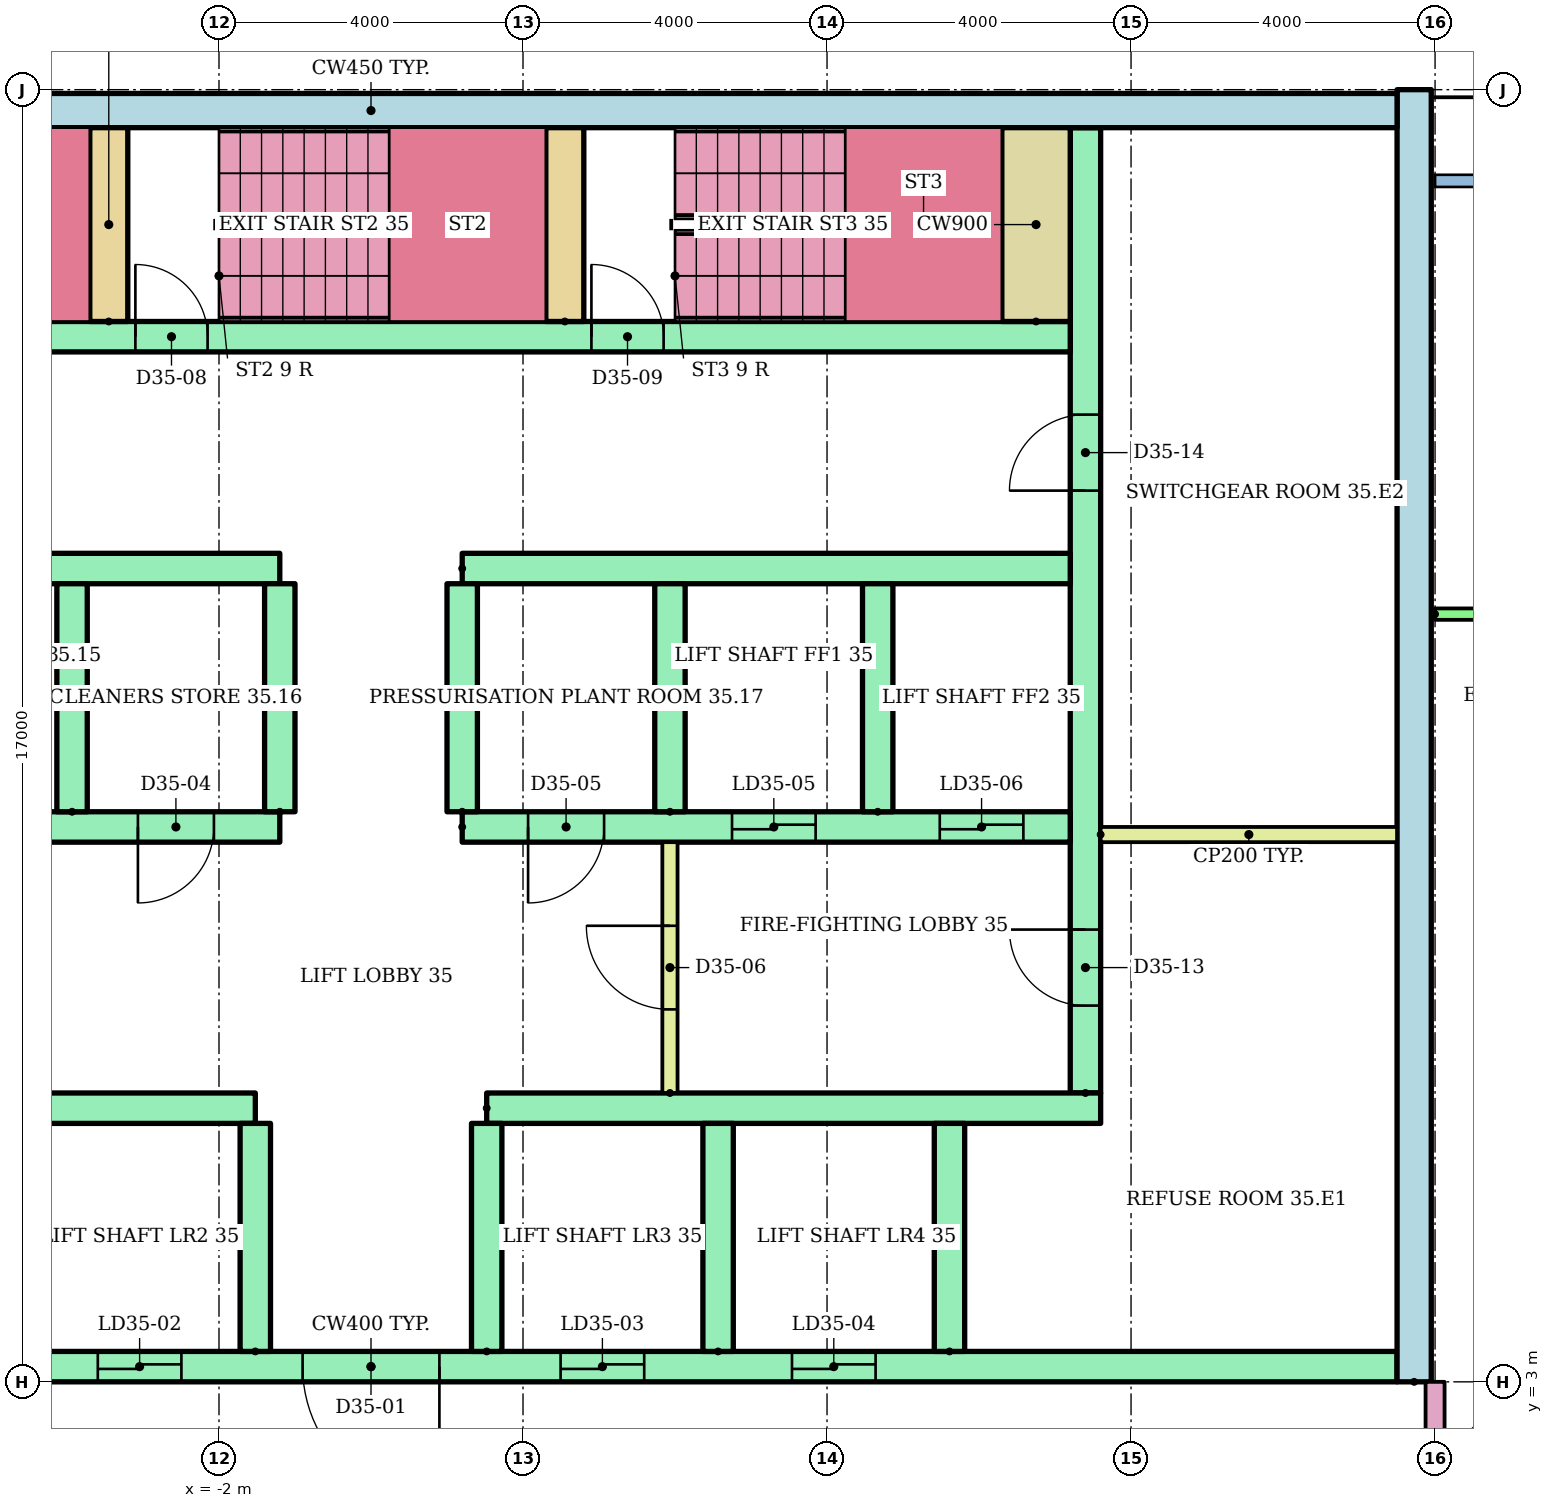
"""IFC4 building model, lengths in metres.
Left out: names, types, materials, properties, quantities, classifications, styles, units other than length and angle.
Written with IfcOpenShell. Run it as: python <this file> out.ifc"""

import sys

from ifc_helpers import new_model, si_unit, direction, frame, frame_2d, origin, place, context, subcontext, project, spatial, rectangle, extrude, element, fill, save


model = new_model("IFC4")
c1 = context("Model", 3, precision=1e-05, world=origin(), true_north=direction((0.0, 1.0)))
c2 = subcontext(c1, "Body", "Model", "MODEL_VIEW")
j1 = project(units=[si_unit("LENGTHUNIT", "METRE"), si_unit("PLANEANGLEUNIT", "RADIAN")], contexts=[c1])
p1 = place(None, origin())
s1 = spatial("IfcSite", under=j1, at=p1, CompositionType="ELEMENT")
p2 = place(p1, origin())
s2 = spatial("IfcBuilding", under=s1, at=p2, CompositionType="ELEMENT")
p3 = place(p2, frame((0.0, 0.0, 135.8)))
s3 = spatial("IfcBuildingStorey", under=s2, at=p3, CompositionType="ELEMENT", Elevation=135.8)
p4 = place(p3, frame((13.725, 3.0, 0.0), z_axis=(0.0, 0.0, 1.0), x_axis=(0.0, 1.0, 0.0)))
e1 = element("IfcWall", 1, at=p4, inside=s3, PredefinedType="SHEAR", context=c2, shape_type="SweptSolid", body=[
    extrude(rectangle(XDim=17.0, YDim=0.45, at=frame_2d((8.5, 0.0))), origin(), (0.0, 0.0, 1.0), 2.92),
])
p5 = place(p3, frame((-13.5, 19.725, 0.0)))
e2 = element("IfcWall", 2, at=p5, inside=s3, PredefinedType="SHEAR", context=c2, shape_type="SweptSolid", body=[
    extrude(rectangle(XDim=27.0, YDim=0.45, at=frame_2d((13.5, 0.0))), origin(), (0.0, 0.0, 1.0), 2.92),
])
p6 = place(p3, frame((9.4, 6.8, 0.0), z_axis=(0.0, 0.0, 1.0), x_axis=(0.0, 1.0, 0.0)))
e3 = element("IfcWall", 3, at=p6, inside=s3, PredefinedType="SHEAR", context=c2, shape_type="SweptSolid", body=[
    extrude(rectangle(XDim=12.7, YDim=0.4, at=frame_2d((6.35, 0.0))), origin(), (0.0, 0.0, 1.0), 2.92),
])
p7 = place(p6, frame((1.15, 0.0, 0.0)))
e4 = element("IfcOpeningElement", 4, at=p7, cuts=e3, PredefinedType="OPENING", context=c2, shape_type="SweptSolid", body=[
    extrude(rectangle(XDim=1.0, YDim=2.1, at=frame_2d((0.5, 1.05))), frame((0.0, 0.21, 0.0), z_axis=(0.0, -1.0, 0.0), x_axis=(1.0, 0.0, 0.0)), (0.0, 0.0, 1.0), 0.42),
])
p8 = place(p6, frame((7.925, 0.0, 0.0)))
e5 = element("IfcOpeningElement", 5, at=p8, cuts=e3, PredefinedType="OPENING", context=c2, shape_type="SweptSolid", body=[
    extrude(rectangle(XDim=1.0, YDim=2.1, at=frame_2d((0.5, 1.05))), frame((0.0, 0.21, 0.0), z_axis=(0.0, -1.0, 0.0), x_axis=(1.0, 0.0, 0.0)), (0.0, 0.0, 1.0), 0.42),
])
p9 = place(p3, frame((-13.5, 3.2, 0.0)))
e6 = element("IfcWall", 6, at=p9, inside=s3, PredefinedType="SHEAR", context=c2, shape_type="SweptSolid", body=[
    extrude(rectangle(XDim=27.0, YDim=0.4, at=frame_2d((13.5, 0.0))), origin(), (0.0, 0.0, 1.0), 2.92),
])
p10 = place(p9, frame((6.861, 0.0, 0.0)))
e7 = element("IfcOpeningElement", 7, at=p10, cuts=e6, PredefinedType="OPENING", context=c2, shape_type="SweptSolid", body=[
    extrude(rectangle(XDim=1.1, YDim=2.1, at=frame_2d((0.55, 1.05))), frame((0.0, 0.21, 0.0), z_axis=(0.0, -1.0, 0.0), x_axis=(1.0, 0.0, 0.0)), (0.0, 0.0, 1.0), 0.42),
])
p11 = place(p9, frame((9.906, 0.0, 0.0)))
e8 = element("IfcOpeningElement", 8, at=p11, cuts=e6, PredefinedType="OPENING", context=c2, shape_type="SweptSolid", body=[
    extrude(rectangle(XDim=1.1, YDim=2.1, at=frame_2d((0.55, 1.05))), frame((0.0, 0.21, 0.0), z_axis=(0.0, -1.0, 0.0), x_axis=(1.0, 0.0, 0.0)), (0.0, 0.0, 1.0), 0.42),
])
p12 = place(p9, frame((15.994, 0.0, 0.0)))
e9 = element("IfcOpeningElement", 9, at=p12, cuts=e6, PredefinedType="OPENING", context=c2, shape_type="SweptSolid", body=[
    extrude(rectangle(XDim=1.1, YDim=2.1, at=frame_2d((0.55, 1.05))), frame((0.0, 0.21, 0.0), z_axis=(0.0, -1.0, 0.0), x_axis=(1.0, 0.0, 0.0)), (0.0, 0.0, 1.0), 0.42),
])
p13 = place(p9, frame((19.039, 0.0, 0.0)))
e10 = element("IfcOpeningElement", 10, at=p13, cuts=e6, PredefinedType="OPENING", context=c2, shape_type="SweptSolid", body=[
    extrude(rectangle(XDim=1.1, YDim=2.1, at=frame_2d((0.55, 1.05))), frame((0.0, 0.21, 0.0), z_axis=(0.0, -1.0, 0.0), x_axis=(1.0, 0.0, 0.0)), (0.0, 0.0, 1.0), 0.42),
])
p14 = place(p9, frame((12.6, 0.0, 0.0)))
e11 = element("IfcOpeningElement", 11, at=p14, cuts=e6, PredefinedType="OPENING", context=c2, shape_type="SweptSolid", body=[
    extrude(rectangle(XDim=1.8, YDim=2.1, at=frame_2d((0.9, 1.05))), frame((0.0, 0.21, 0.0), z_axis=(0.0, -1.0, 0.0), x_axis=(1.0, 0.0, 0.0)), (0.0, 0.0, 1.0), 0.42),
])
p15 = place(p3, frame((-13.5, 6.6, 0.0)))
e12 = element("IfcWall", 12, at=p15, inside=s3, PredefinedType="SHEAR", context=c2, shape_type="SweptSolid", body=[
    extrude(rectangle(XDim=11.978, YDim=0.4, at=frame_2d((5.989, 0.0))), origin(), (0.0, 0.0, 1.0), 2.92),
])
p16 = place(p3, frame((1.522, 6.6, 0.0)))
e13 = element("IfcWall", 13, at=p16, inside=s3, PredefinedType="SHEAR", context=c2, shape_type="SweptSolid", body=[
    extrude(rectangle(XDim=8.078, YDim=0.4, at=frame_2d((4.039, 0.0))), origin(), (0.0, 0.0, 1.0), 2.92),
])
for number, where, z_axis, x_axis in (
    (14, (-1.522, 3.4, 0.0), (0.0, 0.0, 1.0), (0.0, 1.0, 0.0)),
    (15, (1.522, 3.4, 0.0), (0.0, 0.0, 1.0), (0.0, 1.0, 0.0)),
    (16, (4.567, 3.4, 0.0), (0.0, 0.0, 1.0), (0.0, 1.0, 0.0)),
    (17, (7.611, 3.4, 0.0), (0.0, 0.0, 1.0), (0.0, 1.0, 0.0)),
):
    element("IfcWall", number, at=place(p3, frame(where, z_axis=z_axis, x_axis=x_axis)), inside=s3, PredefinedType="SHEAR", context=c2, shape_type="SweptSolid", body=[
        extrude(rectangle(XDim=3.0, YDim=0.4, at=frame_2d((1.5, 0.0))), origin(), (0.0, 0.0, 1.0), 2.92),
    ])
p17 = place(p3, frame((-9.2, 10.3, 0.0)))
e18 = element("IfcWall", 18, at=p17, inside=s3, PredefinedType="SHEAR", context=c2, shape_type="SweptSolid", body=[
    extrude(rectangle(XDim=8.0, YDim=0.4, at=frame_2d((4.0, 0.0))), origin(), (0.0, 0.0, 1.0), 2.92),
])
p18 = place(p17, frame((0.917, 0.0, 0.0)))
e19 = element("IfcOpeningElement", 19, at=p18, cuts=e18, PredefinedType="OPENING", context=c2, shape_type="SweptSolid", body=[
    extrude(rectangle(XDim=1.0, YDim=2.1, at=frame_2d((0.5, 1.05))), frame((0.0, 0.21, 0.0), z_axis=(0.0, -1.0, 0.0), x_axis=(1.0, 0.0, 0.0)), (0.0, 0.0, 1.0), 0.42),
])
p19 = place(p17, frame((3.4, 0.0, 0.0)))
e20 = element("IfcOpeningElement", 20, at=p19, cuts=e18, PredefinedType="OPENING", context=c2, shape_type="SweptSolid", body=[
    extrude(rectangle(XDim=1.0, YDim=2.1, at=frame_2d((0.5, 1.05))), frame((0.0, 0.21, 0.0), z_axis=(0.0, -1.0, 0.0), x_axis=(1.0, 0.0, 0.0)), (0.0, 0.0, 1.0), 0.42),
])
p20 = place(p17, frame((6.133, 0.0, 0.0)))
e21 = element("IfcOpeningElement", 21, at=p20, cuts=e18, PredefinedType="OPENING", context=c2, shape_type="SweptSolid", body=[
    extrude(rectangle(XDim=1.0, YDim=2.1, at=frame_2d((0.5, 1.05))), frame((0.0, 0.21, 0.0), z_axis=(0.0, -1.0, 0.0), x_axis=(1.0, 0.0, 0.0)), (0.0, 0.0, 1.0), 0.42),
])
p21 = place(p3, frame((-9.2, 13.7, 0.0)))
e22 = element("IfcWall", 22, at=p21, inside=s3, PredefinedType="SHEAR", context=c2, shape_type="SweptSolid", body=[
    extrude(rectangle(XDim=8.0, YDim=0.4, at=frame_2d((4.0, 0.0))), origin(), (0.0, 0.0, 1.0), 2.92),
])
p22 = place(p3, frame((1.2, 10.3, 0.0)))
e23 = element("IfcWall", 23, at=p22, inside=s3, PredefinedType="SHEAR", context=c2, shape_type="SweptSolid", body=[
    extrude(rectangle(XDim=8.0, YDim=0.4, at=frame_2d((4.0, 0.0))), origin(), (0.0, 0.0, 1.0), 2.92),
])
p23 = place(p22, frame((3.55, 0.0, 0.0)))
e24 = element("IfcOpeningElement", 24, at=p23, cuts=e23, PredefinedType="OPENING", context=c2, shape_type="SweptSolid", body=[
    extrude(rectangle(XDim=1.1, YDim=2.1, at=frame_2d((0.55, 1.05))), frame((0.0, 0.21, 0.0), z_axis=(0.0, -1.0, 0.0), x_axis=(1.0, 0.0, 0.0)), (0.0, 0.0, 1.0), 0.42),
])
p24 = place(p22, frame((6.283, 0.0, 0.0)))
e25 = element("IfcOpeningElement", 25, at=p24, cuts=e23, PredefinedType="OPENING", context=c2, shape_type="SweptSolid", body=[
    extrude(rectangle(XDim=1.1, YDim=2.1, at=frame_2d((0.55, 1.05))), frame((0.0, 0.21, 0.0), z_axis=(0.0, -1.0, 0.0), x_axis=(1.0, 0.0, 0.0)), (0.0, 0.0, 1.0), 0.42),
])
p25 = place(p22, frame((0.867, 0.0, 0.0)))
e26 = element("IfcOpeningElement", 26, at=p25, cuts=e23, PredefinedType="OPENING", context=c2, shape_type="SweptSolid", body=[
    extrude(rectangle(XDim=1.0, YDim=2.1, at=frame_2d((0.5, 1.05))), frame((0.0, 0.21, 0.0), z_axis=(0.0, -1.0, 0.0), x_axis=(1.0, 0.0, 0.0)), (0.0, 0.0, 1.0), 0.42),
])
p26 = place(p3, frame((1.2, 13.7, 0.0)))
e27 = element("IfcWall", 27, at=p26, inside=s3, PredefinedType="SHEAR", context=c2, shape_type="SweptSolid", body=[
    extrude(rectangle(XDim=8.0, YDim=0.4, at=frame_2d((4.0, 0.0))), origin(), (0.0, 0.0, 1.0), 2.92),
])
for number, where, z_axis, x_axis in (
    (28, (-3.933, 10.5, 0.0), (0.0, 0.0, 1.0), (0.0, 1.0, 0.0)),
    (29, (-1.2, 10.5, 0.0), (0.0, 0.0, 1.0), (0.0, 1.0, 0.0)),
    (30, (1.2, 10.5, 0.0), (0.0, 0.0, 1.0), (0.0, 1.0, 0.0)),
    (31, (3.933, 10.5, 0.0), (0.0, 0.0, 1.0), (0.0, 1.0, 0.0)),
    (32, (6.667, 10.5, 0.0), (0.0, 0.0, 1.0), (0.0, 1.0, 0.0)),
):
    element("IfcWall", number, at=place(p3, frame(where, z_axis=z_axis, x_axis=x_axis)), inside=s3, PredefinedType="SHEAR", context=c2, shape_type="SweptSolid", body=[
        extrude(rectangle(XDim=3.0, YDim=0.4, at=frame_2d((1.5, 0.0))), origin(), (0.0, 0.0, 1.0), 2.92),
    ])
p27 = place(p3, frame((3.933, 6.8, 0.0), z_axis=(0.0, 0.0, 1.0), x_axis=(0.0, 1.0, 0.0)))
e33 = element("IfcWall", 33, at=p27, inside=s3, PredefinedType="PARTITIONING", context=c2, shape_type="SweptSolid", body=[
    extrude(rectangle(XDim=3.3, YDim=0.2, at=frame_2d((1.65, 0.0))), origin(), (0.0, 0.0, 1.0), 2.92),
])
p28 = place(p27, frame((1.1, 0.0, 0.0)))
e34 = element("IfcOpeningElement", 34, at=p28, cuts=e33, PredefinedType="OPENING", context=c2, shape_type="SweptSolid", body=[
    extrude(rectangle(XDim=1.1, YDim=2.1, at=frame_2d((0.55, 1.05))), frame((0.0, 0.11, 0.0), z_axis=(0.0, -1.0, 0.0), x_axis=(1.0, 0.0, 0.0)), (0.0, 0.0, 1.0), 0.22),
])
p29 = place(p3, frame((-9.2, 16.75, 0.0)))
e35 = element("IfcWall", 35, at=p29, inside=s3, PredefinedType="SHEAR", context=c2, shape_type="SweptSolid", body=[
    extrude(rectangle(XDim=18.4, YDim=0.4, at=frame_2d((9.2, 0.0))), origin(), (0.0, 0.0, 1.0), 2.92),
])
p30 = place(p29, frame((0.1, 0.0, 0.0)))
e36 = element("IfcOpeningElement", 36, at=p30, cuts=e35, PredefinedType="OPENING", context=c2, shape_type="SweptSolid", body=[
    extrude(rectangle(XDim=0.95, YDim=2.1, at=frame_2d((0.475, 1.05))), frame((0.0, 0.21, 0.0), z_axis=(0.0, -1.0, 0.0), x_axis=(1.0, 0.0, 0.0)), (0.0, 0.0, 1.0), 0.42),
])
p31 = place(p29, frame((6.1, 0.0, 0.0)))
e37 = element("IfcOpeningElement", 37, at=p31, cuts=e35, PredefinedType="OPENING", context=c2, shape_type="SweptSolid", body=[
    extrude(rectangle(XDim=0.95, YDim=2.1, at=frame_2d((0.475, 1.05))), frame((0.0, 0.21, 0.0), z_axis=(0.0, -1.0, 0.0), x_axis=(1.0, 0.0, 0.0)), (0.0, 0.0, 1.0), 0.42),
])
p32 = place(p29, frame((12.1, 0.0, 0.0)))
e38 = element("IfcOpeningElement", 38, at=p32, cuts=e35, PredefinedType="OPENING", context=c2, shape_type="SweptSolid", body=[
    extrude(rectangle(XDim=0.95, YDim=2.1, at=frame_2d((0.475, 1.05))), frame((0.0, 0.21, 0.0), z_axis=(0.0, -1.0, 0.0), x_axis=(1.0, 0.0, 0.0)), (0.0, 0.0, 1.0), 0.42),
])
for number, where, z_axis, x_axis in (
    (39, (-3.45, 16.95, 0.0), (0.0, 0.0, 1.0), (0.0, 1.0, 0.0)),
    (40, (2.55, 16.95, 0.0), (0.0, 0.0, 1.0), (0.0, 1.0, 0.0)),
):
    element("IfcWall", number, at=place(p3, frame(where, z_axis=z_axis, x_axis=x_axis)), inside=s3, PredefinedType="SHEAR", context=c2, shape_type="SweptSolid", body=[
        extrude(rectangle(XDim=2.55, YDim=0.5, at=frame_2d((1.275, 0.0))), origin(), (0.0, 0.0, 1.0), 2.92),
    ])
p33 = place(p3, frame((8.75, 16.95, 0.0), z_axis=(0.0, 0.0, 1.0), x_axis=(0.0, 1.0, 0.0)))
e41 = element("IfcWall", 41, at=p33, inside=s3, PredefinedType="SHEAR", context=c2, shape_type="SweptSolid", body=[
    extrude(rectangle(XDim=2.55, YDim=0.9, at=frame_2d((1.275, 0.0))), origin(), (0.0, 0.0, 1.0), 2.92),
])
p34 = place(p3, frame((9.6, 10.2, 0.0)))
e42 = element("IfcWall", 42, at=p34, inside=s3, PredefinedType="PARTITIONING", context=c2, shape_type="SweptSolid", body=[
    extrude(rectangle(XDim=3.9, YDim=0.2, at=frame_2d((1.95, 0.0))), origin(), (0.0, 0.0, 1.0), 2.92),
])
p35 = place(p3, frame((14.0, 13.1, 0.0)))
e43 = element("IfcWall", 43, at=p35, inside=s3, PredefinedType="PARTITIONING", context=c2, shape_type="SweptSolid", body=[
    extrude(rectangle(XDim=18.72, YDim=0.15, at=frame_2d((9.36, 0.0))), origin(), (0.0, 0.0, 1.0), 2.4),
])
p36 = place(p35, frame((1.55, 0.0, 0.0)))
e44 = element("IfcOpeningElement", 44, at=p36, cuts=e43, PredefinedType="OPENING", context=c2, shape_type="SweptSolid", body=[
    extrude(rectangle(XDim=0.9, YDim=2.1, at=frame_2d((0.45, 1.05))), frame((0.0, 0.085, 0.0), z_axis=(0.0, -1.0, 0.0), x_axis=(1.0, 0.0, 0.0)), (0.0, 0.0, 1.0), 0.17),
])
p37 = place(p35, frame((7.55, 0.0, 0.0)))
e45 = element("IfcOpeningElement", 45, at=p37, cuts=e43, PredefinedType="OPENING", context=c2, shape_type="SweptSolid", body=[
    extrude(rectangle(XDim=0.9, YDim=2.1, at=frame_2d((0.45, 1.05))), frame((0.0, 0.085, 0.0), z_axis=(0.0, -1.0, 0.0), x_axis=(1.0, 0.0, 0.0)), (0.0, 0.0, 1.0), 0.17),
])
p38 = place(p35, frame((14.75, 0.0, 0.0)))
e46 = element("IfcOpeningElement", 46, at=p38, cuts=e43, PredefinedType="OPENING", context=c2, shape_type="SweptSolid", body=[
    extrude(rectangle(XDim=1.0, YDim=2.1, at=frame_2d((0.5, 1.05))), frame((0.0, 0.085, 0.0), z_axis=(0.0, -1.0, 0.0), x_axis=(1.0, 0.0, 0.0)), (0.0, 0.0, 1.0), 0.17),
])
p39 = place(p3, frame((14.0, 1.4, 0.0), z_axis=(0.0, 0.0, 1.0), x_axis=(0.0, 1.0, 0.0)))
e47 = element("IfcWall", 47, at=p39, inside=s3, PredefinedType="PARTITIONING", context=c2, shape_type="SweptSolid", body=[
    extrude(rectangle(XDim=1.6, YDim=0.25, at=frame_2d((0.8, 0.0))), origin(), (0.0, 0.0, 1.0), 2.4),
])
p40 = place(p11, origin())
e48 = element("IfcDoor", 48, at=p40, inside=s3, OperationType="SLIDING_TO_LEFT", PredefinedType="DOOR", context=c2, shape_type="SweptSolid", body=[
    extrude(rectangle(XDim=1.1, YDim=2.1, at=frame_2d((0.55, 1.05))), frame((0.0, 0.025, 0.0), z_axis=(0.0, -1.0, 0.0), x_axis=(1.0, 0.0, 0.0)), (0.0, 0.0, 1.0), 0.05),
])
fill(e8, e48)
p41 = place(p12, origin())
e49 = element("IfcDoor", 49, at=p41, inside=s3, OperationType="SLIDING_TO_LEFT", PredefinedType="DOOR", context=c2, shape_type="SweptSolid", body=[
    extrude(rectangle(XDim=1.1, YDim=2.1, at=frame_2d((0.55, 1.05))), frame((0.0, 0.025, 0.0), z_axis=(0.0, -1.0, 0.0), x_axis=(1.0, 0.0, 0.0)), (0.0, 0.0, 1.0), 0.05),
])
fill(e9, e49)
p42 = place(p13, origin())
e50 = element("IfcDoor", 50, at=p42, inside=s3, OperationType="SLIDING_TO_LEFT", PredefinedType="DOOR", context=c2, shape_type="SweptSolid", body=[
    extrude(rectangle(XDim=1.1, YDim=2.1, at=frame_2d((0.55, 1.05))), frame((0.0, 0.025, 0.0), z_axis=(0.0, -1.0, 0.0), x_axis=(1.0, 0.0, 0.0)), (0.0, 0.0, 1.0), 0.05),
])
fill(e10, e50)
p43 = place(p14, frame((1.8, 0.0, 0.0), z_axis=(0.0, 0.0, 1.0), x_axis=(-1.0, 0.0, 0.0)))
e51 = element("IfcDoor", 51, at=p43, inside=s3, OperationType="DOUBLE_DOOR_SINGLE_SWING", PredefinedType="DOOR", context=c2, shape_type="SweptSolid", body=[
    extrude(rectangle(XDim=1.8, YDim=2.1, at=frame_2d((0.9, 1.05))), frame((0.0, 0.025, 0.0), z_axis=(0.0, -1.0, 0.0), x_axis=(1.0, 0.0, 0.0)), (0.0, 0.0, 1.0), 0.05),
])
fill(e11, e51)
p44 = place(p23, origin())
e52 = element("IfcDoor", 52, at=p44, inside=s3, OperationType="SLIDING_TO_LEFT", PredefinedType="DOOR", context=c2, shape_type="SweptSolid", body=[
    extrude(rectangle(XDim=1.1, YDim=2.1, at=frame_2d((0.55, 1.05))), frame((0.0, 0.025, 0.0), z_axis=(0.0, -1.0, 0.0), x_axis=(1.0, 0.0, 0.0)), (0.0, 0.0, 1.0), 0.05),
])
fill(e24, e52)
p45 = place(p24, origin())
e53 = element("IfcDoor", 53, at=p45, inside=s3, OperationType="SLIDING_TO_LEFT", PredefinedType="DOOR", context=c2, shape_type="SweptSolid", body=[
    extrude(rectangle(XDim=1.1, YDim=2.1, at=frame_2d((0.55, 1.05))), frame((0.0, 0.025, 0.0), z_axis=(0.0, -1.0, 0.0), x_axis=(1.0, 0.0, 0.0)), (0.0, 0.0, 1.0), 0.05),
])
fill(e25, e53)
p46 = place(p20, frame((1.0, 0.0, 0.0), z_axis=(0.0, 0.0, 1.0), x_axis=(-1.0, 0.0, 0.0)))
e54 = element("IfcDoor", 54, at=p46, inside=s3, OperationType="SINGLE_SWING_LEFT", PredefinedType="DOOR", context=c2, shape_type="SweptSolid", body=[
    extrude(rectangle(XDim=1.0, YDim=2.1, at=frame_2d((0.5, 1.05))), frame((0.0, 0.025, 0.0), z_axis=(0.0, -1.0, 0.0), x_axis=(1.0, 0.0, 0.0)), (0.0, 0.0, 1.0), 0.05),
])
fill(e21, e54)
p47 = place(p25, frame((1.0, 0.0, 0.0), z_axis=(0.0, 0.0, 1.0), x_axis=(-1.0, 0.0, 0.0)))
e55 = element("IfcDoor", 55, at=p47, inside=s3, OperationType="SINGLE_SWING_LEFT", PredefinedType="DOOR", context=c2, shape_type="SweptSolid", body=[
    extrude(rectangle(XDim=1.0, YDim=2.1, at=frame_2d((0.5, 1.05))), frame((0.0, 0.025, 0.0), z_axis=(0.0, -1.0, 0.0), x_axis=(1.0, 0.0, 0.0)), (0.0, 0.0, 1.0), 0.05),
])
fill(e26, e55)
p48 = place(p28, origin())
e56 = element("IfcDoor", 56, at=p48, inside=s3, OperationType="SINGLE_SWING_RIGHT", PredefinedType="DOOR", context=c2, shape_type="SweptSolid", body=[
    extrude(rectangle(XDim=1.1, YDim=2.1, at=frame_2d((0.55, 1.05))), frame((0.0, 0.025, 0.0), z_axis=(0.0, -1.0, 0.0), x_axis=(1.0, 0.0, 0.0)), (0.0, 0.0, 1.0), 0.05),
])
fill(e34, e56)
p49 = place(p31, origin())
e57 = element("IfcDoor", 57, at=p49, inside=s3, OperationType="SINGLE_SWING_LEFT", PredefinedType="DOOR", context=c2, shape_type="SweptSolid", body=[
    extrude(rectangle(XDim=0.95, YDim=2.1, at=frame_2d((0.475, 1.05))), frame((0.0, 0.025, 0.0), z_axis=(0.0, -1.0, 0.0), x_axis=(1.0, 0.0, 0.0)), (0.0, 0.0, 1.0), 0.05),
])
fill(e37, e57)
p50 = place(p32, origin())
e58 = element("IfcDoor", 58, at=p50, inside=s3, OperationType="SINGLE_SWING_LEFT", PredefinedType="DOOR", context=c2, shape_type="SweptSolid", body=[
    extrude(rectangle(XDim=0.95, YDim=2.1, at=frame_2d((0.475, 1.05))), frame((0.0, 0.025, 0.0), z_axis=(0.0, -1.0, 0.0), x_axis=(1.0, 0.0, 0.0)), (0.0, 0.0, 1.0), 0.05),
])
fill(e38, e58)
p51 = place(p7, origin())
e59 = element("IfcDoor", 59, at=p51, inside=s3, OperationType="SINGLE_SWING_RIGHT", PredefinedType="DOOR", context=c2, shape_type="SweptSolid", body=[
    extrude(rectangle(XDim=1.0, YDim=2.1, at=frame_2d((0.5, 1.05))), frame((0.0, 0.025, 0.0), z_axis=(0.0, -1.0, 0.0), x_axis=(1.0, 0.0, 0.0)), (0.0, 0.0, 1.0), 0.05),
])
fill(e4, e59)
p52 = place(p8, origin())
e60 = element("IfcDoor", 60, at=p52, inside=s3, OperationType="SINGLE_SWING_LEFT", PredefinedType="DOOR", context=c2, shape_type="SweptSolid", body=[
    extrude(rectangle(XDim=1.0, YDim=2.1, at=frame_2d((0.5, 1.05))), frame((0.0, 0.025, 0.0), z_axis=(0.0, -1.0, 0.0), x_axis=(1.0, 0.0, 0.0)), (0.0, 0.0, 1.0), 0.05),
])
fill(e5, e60)
save(model, sys.argv[1])
